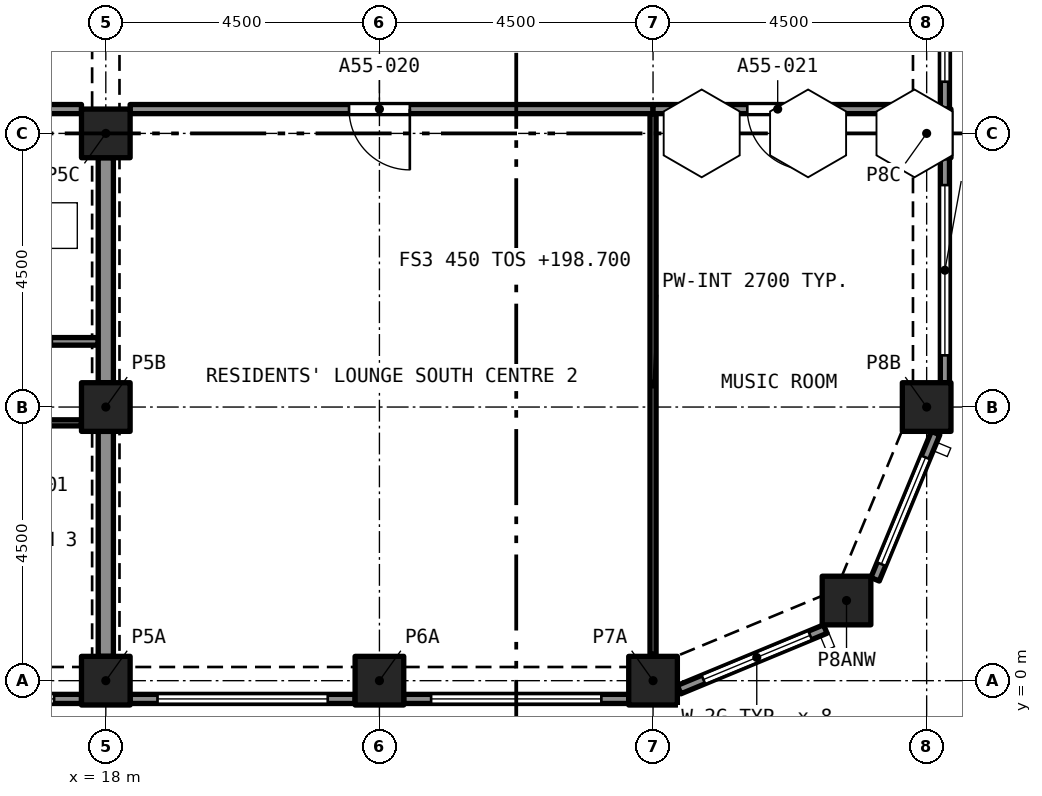
"""IFC4 building model, lengths in metres.
Left out: names, types, materials, properties, quantities, classifications, styles, units other than length and angle.
Written with IfcOpenShell. Run it as: python <this file> out.ifc"""

import sys

from ifc_helpers import new_model, si_unit, direction, frame, frame_2d, origin, origin_2d, place, context, subcontext, project, spatial, rectangle, extrude, element, fill, save


model = new_model("IFC4")
c1 = context("Model", 3, precision=1e-05, world=origin(), true_north=direction((0.0, 1.0)))
c2 = subcontext(c1, "Body", "Model", "MODEL_VIEW")
j1 = project(units=[si_unit("LENGTHUNIT", "METRE"), si_unit("PLANEANGLEUNIT", "RADIAN")], contexts=[c1])
p1 = place(None, origin())
s1 = spatial("IfcSite", under=j1, at=p1, CompositionType="ELEMENT")
p2 = place(p1, origin())
s2 = spatial("IfcBuilding", under=s1, at=p2, CompositionType="ELEMENT")
p3 = place(p2, frame((0.0, 0.0, 198.7)))
s3 = spatial("IfcBuildingStorey", under=s2, at=p3, CompositionType="ELEMENT", Elevation=198.7)
for number, where, z_axis, x_axis in (
    (1, (18.0, 0.0, 0.0), (0.0, 0.0, 1.0), (1.0, 0.0, 0.0)),
    (2, (22.5, 0.0, 0.0), (0.0, 0.0, 1.0), (1.0, 0.0, 0.0)),
    (3, (27.0, 0.0, 0.0), (0.0, 0.0, 1.0), (1.0, 0.0, 0.0)),
    (4, (30.182, 1.318, 0.0), (0.0, 0.0, 1.0), (1.0, 0.0, 0.0)),
    (5, (18.0, 4.5, 0.0), (0.0, 0.0, 1.0), (1.0, 0.0, 0.0)),
    (6, (31.5, 4.5, 0.0), (0.0, 0.0, 1.0), (1.0, 0.0, 0.0)),
    (7, (18.0, 9.0, 0.0), (0.0, 0.0, 1.0), (1.0, 0.0, 0.0)),
    (8, (31.5, 9.0, 0.0), (0.0, 0.0, 1.0), (1.0, 0.0, 0.0)),
):
    element("IfcColumn", number, at=place(p3, frame(where, z_axis=z_axis, x_axis=x_axis)), inside=s3, PredefinedType="COLUMN", context=c2, shape_type="SweptSolid", body=[
        extrude(rectangle(XDim=0.8, YDim=0.8, at=origin_2d()), origin(), (0.0, 0.0, 1.0), 3.2),
    ])
p4 = place(p3, frame((29.833, 0.849, 0.0), z_axis=(0.0, 0.0, 1.0), x_axis=(-0.923885342263, -0.382669406082, 0.0)))
e9 = element("IfcWall", 9, at=p4, inside=s3, PredefinedType="SOLIDWALL", context=c2, shape_type="SweptSolid", body=[
    extrude(rectangle(XDim=2.602, YDim=0.15, at=frame_2d((1.301, 0.0))), origin(), (0.0, 0.0, 1.0), 3.2),
])
p5 = place(p4, frame((0.27, 0.0, 0.45)))
e10 = element("IfcOpeningElement", 10, at=p5, cuts=e9, PredefinedType="OPENING", context=c2, shape_type="SweptSolid", body=[
    extrude(rectangle(XDim=1.9, YDim=1.95, at=frame_2d((0.95, 0.975))), frame((0.0, 0.085, 0.0), z_axis=(0.0, -1.0, 0.0), x_axis=(1.0, 0.0, 0.0)), (0.0, 0.0, 1.0), 0.17),
])
p6 = place(p3, frame((31.647, 4.071, 0.0), z_axis=(0.0, 0.0, 1.0), x_axis=(-0.382669406082, -0.923885342263, 0.0)))
e11 = element("IfcWall", 11, at=p6, inside=s3, PredefinedType="SOLIDWALL", context=c2, shape_type="SweptSolid", body=[
    extrude(rectangle(XDim=2.602, YDim=0.15, at=frame_2d((1.301, 0.0))), origin(), (0.0, 0.0, 1.0), 3.2),
])
p7 = place(p6, frame((0.432, 0.0, 0.45)))
e12 = element("IfcOpeningElement", 12, at=p7, cuts=e11, PredefinedType="OPENING", context=c2, shape_type="SweptSolid", body=[
    extrude(rectangle(XDim=1.9, YDim=1.95, at=frame_2d((0.95, 0.975))), frame((0.0, 0.085, 0.0), z_axis=(0.0, -1.0, 0.0), x_axis=(1.0, 0.0, 0.0)), (0.0, 0.0, 1.0), 0.17),
])
p8 = place(p3, frame((31.8, 8.6, 0.0), z_axis=(0.0, 0.0, 1.0), x_axis=(0.0, -1.0, 0.0)))
e13 = element("IfcWall", 13, at=p8, inside=s3, PredefinedType="SOLIDWALL", context=c2, shape_type="SweptSolid", body=[
    extrude(rectangle(XDim=3.7, YDim=0.15, at=frame_2d((1.85, 0.0))), origin(), (0.0, 0.0, 1.0), 3.2),
])
p9 = place(p8, frame((0.45, 0.0, 0.45)))
e14 = element("IfcOpeningElement", 14, at=p9, cuts=e13, PredefinedType="OPENING", context=c2, shape_type="SweptSolid", body=[
    extrude(rectangle(XDim=2.8, YDim=1.95, at=frame_2d((1.4, 0.975))), frame((0.0, 0.085, 0.0), z_axis=(0.0, -1.0, 0.0), x_axis=(1.0, 0.0, 0.0)), (0.0, 0.0, 1.0), 0.17),
])
p10 = place(p3, frame((31.8, 13.1, 0.0), z_axis=(0.0, 0.0, 1.0), x_axis=(0.0, -1.0, 0.0)))
e15 = element("IfcWall", 15, at=p10, inside=s3, PredefinedType="SOLIDWALL", context=c2, shape_type="SweptSolid", body=[
    extrude(rectangle(XDim=3.7, YDim=0.15, at=frame_2d((1.85, 0.0))), origin(), (0.0, 0.0, 1.0), 3.2),
])
p11 = place(p10, frame((0.45, 0.0, 0.45)))
e16 = element("IfcOpeningElement", 16, at=p11, cuts=e15, PredefinedType="OPENING", context=c2, shape_type="SweptSolid", body=[
    extrude(rectangle(XDim=2.8, YDim=1.95, at=frame_2d((1.4, 0.975))), frame((0.0, 0.085, 0.0), z_axis=(0.0, -1.0, 0.0), x_axis=(1.0, 0.0, 0.0)), (0.0, 0.0, 1.0), 0.17),
])
p12 = place(p3, frame((17.6, -0.3, 0.0), z_axis=(0.0, 0.0, 1.0), x_axis=(-1.0, 0.0, 0.0)))
e17 = element("IfcWall", 17, at=p12, inside=s3, PredefinedType="SOLIDWALL", context=c2, shape_type="SweptSolid", body=[
    extrude(rectangle(XDim=3.7, YDim=0.15, at=frame_2d((1.85, 0.0))), origin(), (0.0, 0.0, 1.0), 3.2),
])
p13 = place(p12, frame((0.45, 0.0, 0.45)))
e18 = element("IfcOpeningElement", 18, at=p13, cuts=e17, PredefinedType="OPENING", context=c2, shape_type="SweptSolid", body=[
    extrude(rectangle(XDim=2.8, YDim=1.95, at=frame_2d((1.4, 0.975))), frame((0.0, 0.085, 0.0), z_axis=(0.0, -1.0, 0.0), x_axis=(1.0, 0.0, 0.0)), (0.0, 0.0, 1.0), 0.17),
])
p14 = place(p3, frame((22.1, -0.3, 0.0), z_axis=(0.0, 0.0, 1.0), x_axis=(-1.0, 0.0, 0.0)))
e19 = element("IfcWall", 19, at=p14, inside=s3, PredefinedType="SOLIDWALL", context=c2, shape_type="SweptSolid", body=[
    extrude(rectangle(XDim=3.7, YDim=0.15, at=frame_2d((1.85, 0.0))), origin(), (0.0, 0.0, 1.0), 3.2),
])
p15 = place(p14, frame((0.45, 0.0, 0.45)))
e20 = element("IfcOpeningElement", 20, at=p15, cuts=e19, PredefinedType="OPENING", context=c2, shape_type="SweptSolid", body=[
    extrude(rectangle(XDim=2.8, YDim=1.95, at=frame_2d((1.4, 0.975))), frame((0.0, 0.085, 0.0), z_axis=(0.0, -1.0, 0.0), x_axis=(1.0, 0.0, 0.0)), (0.0, 0.0, 1.0), 0.17),
])
p16 = place(p3, frame((26.6, -0.3, 0.0), z_axis=(0.0, 0.0, 1.0), x_axis=(-1.0, 0.0, 0.0)))
e21 = element("IfcWall", 21, at=p16, inside=s3, PredefinedType="SOLIDWALL", context=c2, shape_type="SweptSolid", body=[
    extrude(rectangle(XDim=3.7, YDim=0.15, at=frame_2d((1.85, 0.0))), origin(), (0.0, 0.0, 1.0), 3.2),
])
p17 = place(p16, frame((0.45, 0.0, 0.45)))
e22 = element("IfcOpeningElement", 22, at=p17, cuts=e21, PredefinedType="OPENING", context=c2, shape_type="SweptSolid", body=[
    extrude(rectangle(XDim=2.8, YDim=1.95, at=frame_2d((1.4, 0.975))), frame((0.0, 0.085, 0.0), z_axis=(0.0, -1.0, 0.0), x_axis=(1.0, 0.0, 0.0)), (0.0, 0.0, 1.0), 0.17),
])
p18 = place(p3, frame((15.363, 5.58, 0.0), z_axis=(0.0, 0.0, 1.0), x_axis=(1.0, 0.0, 0.0)))
e23 = element("IfcWall", 23, at=p18, inside=s3, PredefinedType="PARTITIONING", context=c2, shape_type="SweptSolid", body=[
    extrude(rectangle(XDim=2.512, YDim=0.125, at=frame_2d((1.256, 0.0))), origin(), (0.0, 0.0, 1.0), 2.7),
])
p19 = place(p18, frame((0.95, 0.0, 0.0)))
e24 = element("IfcOpeningElement", 24, at=p19, cuts=e23, PredefinedType="OPENING", context=c2, shape_type="SweptSolid", body=[
    extrude(rectangle(XDim=0.8, YDim=2.1, at=frame_2d((0.4, 1.05))), frame((0.0, 0.073, 0.0), z_axis=(0.0, -1.0, 0.0), x_axis=(1.0, 0.0, 0.0)), (0.0, 0.0, 1.0), 0.145),
])
p20 = place(p3, frame((15.425, 9.4, 0.0), z_axis=(0.0, 0.0, 1.0), x_axis=(1.0, 0.0, 0.0)))
e25 = element("IfcWall", 25, at=p20, inside=s3, PredefinedType="PARTITIONING", context=c2, shape_type="SweptSolid", body=[
    extrude(rectangle(XDim=2.175, YDim=0.15, at=frame_2d((1.087, 0.0))), origin(), (0.0, 0.0, 1.0), 2.7),
])
p21 = place(p3, frame((17.6, 4.24, 0.0), z_axis=(0.0, 0.0, 1.0), x_axis=(-1.0, 0.0, 0.0)))
e26 = element("IfcWall", 26, at=p21, inside=s3, PredefinedType="PARTITIONING", context=c2, shape_type="SweptSolid", body=[
    extrude(rectangle(XDim=4.1, YDim=0.1, at=frame_2d((2.05, 0.0))), origin(), (0.0, 0.0, 1.0), 2.7),
])
p22 = place(p21, frame((1.4, 0.0, 0.0)))
e27 = element("IfcOpeningElement", 27, at=p22, cuts=e26, PredefinedType="OPENING", context=c2, shape_type="SweptSolid", body=[
    extrude(rectangle(XDim=0.9, YDim=2.1, at=frame_2d((0.45, 1.05))), frame((0.0, 0.06, 0.0), z_axis=(0.0, -1.0, 0.0), x_axis=(1.0, 0.0, 0.0)), (0.0, 0.0, 1.0), 0.12),
])
for number, where, z_axis, x_axis in (
    (28, (18.0, 0.4, 0.0), (0.0, 0.0, 1.0), (0.0, 1.0, 0.0)),
    (29, (18.0, 4.9, 0.0), (0.0, 0.0, 1.0), (0.0, 1.0, 0.0)),
):
    element("IfcWall", number, at=place(p3, frame(where, z_axis=z_axis, x_axis=x_axis)), inside=s3, PredefinedType="PARTITIONING", context=c2, shape_type="SweptSolid", body=[
        extrude(rectangle(XDim=3.7, YDim=0.25, at=frame_2d((1.85, 0.0))), origin(), (0.0, 0.0, 1.0), 2.38),
    ])
p23 = place(p3, frame((27.0, 0.433, 0.0), z_axis=(0.0, 0.0, 1.0), x_axis=(0.0, 1.0, 0.0)))
e30 = element("IfcWall", 30, at=p23, inside=s3, PredefinedType="PARTITIONING", context=c2, shape_type="SweptSolid", body=[
    extrude(rectangle(XDim=8.892, YDim=0.1, at=frame_2d((4.446, 0.0))), origin(), (0.0, 0.0, 1.0), 2.7),
])
p24 = place(p3, frame((27.0, 9.4, 0.0), z_axis=(0.0, 0.0, 1.0), x_axis=(-1.0, 0.0, 0.0)))
e31 = element("IfcWall", 31, at=p24, inside=s3, PredefinedType="PARTITIONING", context=c2, shape_type="SweptSolid", body=[
    extrude(rectangle(XDim=8.6, YDim=0.15, at=frame_2d((4.3, 0.0))), origin(), (0.0, 0.0, 1.0), 2.7),
])
p25 = place(p24, frame((4.0, 0.0, 0.0)))
e32 = element("IfcOpeningElement", 32, at=p25, cuts=e31, PredefinedType="OPENING", context=c2, shape_type="SweptSolid", body=[
    extrude(rectangle(XDim=1.0, YDim=2.1, at=frame_2d((0.5, 1.05))), frame((0.0, 0.085, 0.0), z_axis=(0.0, -1.0, 0.0), x_axis=(1.0, 0.0, 0.0)), (0.0, 0.0, 1.0), 0.17),
])
p26 = place(p3, frame((31.1, 9.4, 0.0), z_axis=(0.0, 0.0, 1.0), x_axis=(-1.0, 0.0, 0.0)))
e33 = element("IfcWall", 33, at=p26, inside=s3, PredefinedType="PARTITIONING", context=c2, shape_type="SweptSolid", body=[
    extrude(rectangle(XDim=4.1, YDim=0.15, at=frame_2d((2.05, 0.0))), origin(), (0.0, 0.0, 1.0), 2.7),
])
p27 = place(p26, frame((1.55, 0.0, 0.0)))
e34 = element("IfcOpeningElement", 34, at=p27, cuts=e33, PredefinedType="OPENING", context=c2, shape_type="SweptSolid", body=[
    extrude(rectangle(XDim=1.0, YDim=2.1, at=frame_2d((0.5, 1.05))), frame((0.0, 0.085, 0.0), z_axis=(0.0, -1.0, 0.0), x_axis=(1.0, 0.0, 0.0)), (0.0, 0.0, 1.0), 0.17),
])
p28 = place(p5, origin())
e35 = element("IfcWindow", 35, at=p28, inside=s3, PartitioningType="SINGLE_PANEL", PredefinedType="WINDOW", context=c2, shape_type="SweptSolid", body=[
    extrude(rectangle(XDim=1.9, YDim=1.95, at=frame_2d((0.95, 0.975))), frame((0.0, 0.03, 0.0), z_axis=(0.0, -1.0, 0.0), x_axis=(1.0, 0.0, 0.0)), (0.0, 0.0, 1.0), 0.06),
])
fill(e10, e35)
p29 = place(p7, origin())
e36 = element("IfcWindow", 36, at=p29, inside=s3, PartitioningType="SINGLE_PANEL", PredefinedType="WINDOW", context=c2, shape_type="SweptSolid", body=[
    extrude(rectangle(XDim=1.9, YDim=1.95, at=frame_2d((0.95, 0.975))), frame((0.0, 0.03, 0.0), z_axis=(0.0, -1.0, 0.0), x_axis=(1.0, 0.0, 0.0)), (0.0, 0.0, 1.0), 0.06),
])
fill(e12, e36)
p30 = place(p9, origin())
e37 = element("IfcWindow", 37, at=p30, inside=s3, PartitioningType="SINGLE_PANEL", PredefinedType="WINDOW", context=c2, shape_type="SweptSolid", body=[
    extrude(rectangle(XDim=2.8, YDim=1.95, at=frame_2d((1.4, 0.975))), frame((0.0, 0.03, 0.0), z_axis=(0.0, -1.0, 0.0), x_axis=(1.0, 0.0, 0.0)), (0.0, 0.0, 1.0), 0.06),
])
fill(e14, e37)
p31 = place(p11, origin())
e38 = element("IfcWindow", 38, at=p31, inside=s3, PartitioningType="SINGLE_PANEL", PredefinedType="WINDOW", context=c2, shape_type="SweptSolid", body=[
    extrude(rectangle(XDim=2.8, YDim=1.95, at=frame_2d((1.4, 0.975))), frame((0.0, 0.03, 0.0), z_axis=(0.0, -1.0, 0.0), x_axis=(1.0, 0.0, 0.0)), (0.0, 0.0, 1.0), 0.06),
])
fill(e16, e38)
p32 = place(p13, origin())
e39 = element("IfcWindow", 39, at=p32, inside=s3, PartitioningType="SINGLE_PANEL", PredefinedType="WINDOW", context=c2, shape_type="SweptSolid", body=[
    extrude(rectangle(XDim=2.8, YDim=1.95, at=frame_2d((1.4, 0.975))), frame((0.0, 0.03, 0.0), z_axis=(0.0, -1.0, 0.0), x_axis=(1.0, 0.0, 0.0)), (0.0, 0.0, 1.0), 0.06),
])
fill(e18, e39)
p33 = place(p15, origin())
e40 = element("IfcWindow", 40, at=p33, inside=s3, PartitioningType="SINGLE_PANEL", PredefinedType="WINDOW", context=c2, shape_type="SweptSolid", body=[
    extrude(rectangle(XDim=2.8, YDim=1.95, at=frame_2d((1.4, 0.975))), frame((0.0, 0.03, 0.0), z_axis=(0.0, -1.0, 0.0), x_axis=(1.0, 0.0, 0.0)), (0.0, 0.0, 1.0), 0.06),
])
fill(e20, e40)
p34 = place(p17, origin())
e41 = element("IfcWindow", 41, at=p34, inside=s3, PartitioningType="SINGLE_PANEL", PredefinedType="WINDOW", context=c2, shape_type="SweptSolid", body=[
    extrude(rectangle(XDim=2.8, YDim=1.95, at=frame_2d((1.4, 0.975))), frame((0.0, 0.03, 0.0), z_axis=(0.0, -1.0, 0.0), x_axis=(1.0, 0.0, 0.0)), (0.0, 0.0, 1.0), 0.06),
])
fill(e22, e41)
p35 = place(p25, origin())
e42 = element("IfcDoor", 42, at=p35, inside=s3, OperationType="SINGLE_SWING_RIGHT", PredefinedType="DOOR", context=c2, shape_type="SweptSolid", body=[
    extrude(rectangle(XDim=1.0, YDim=2.1, at=frame_2d((0.5, 1.05))), frame((0.0, 0.025, 0.0), z_axis=(0.0, -1.0, 0.0), x_axis=(1.0, 0.0, 0.0)), (0.0, 0.0, 1.0), 0.05),
])
fill(e32, e42)
p36 = place(p27, origin())
e43 = element("IfcDoor", 43, at=p36, inside=s3, OperationType="SINGLE_SWING_RIGHT", PredefinedType="DOOR", context=c2, shape_type="SweptSolid", body=[
    extrude(rectangle(XDim=1.0, YDim=2.1, at=frame_2d((0.5, 1.05))), frame((0.0, 0.025, 0.0), z_axis=(0.0, -1.0, 0.0), x_axis=(1.0, 0.0, 0.0)), (0.0, 0.0, 1.0), 0.05),
])
fill(e34, e43)
save(model, sys.argv[1])
